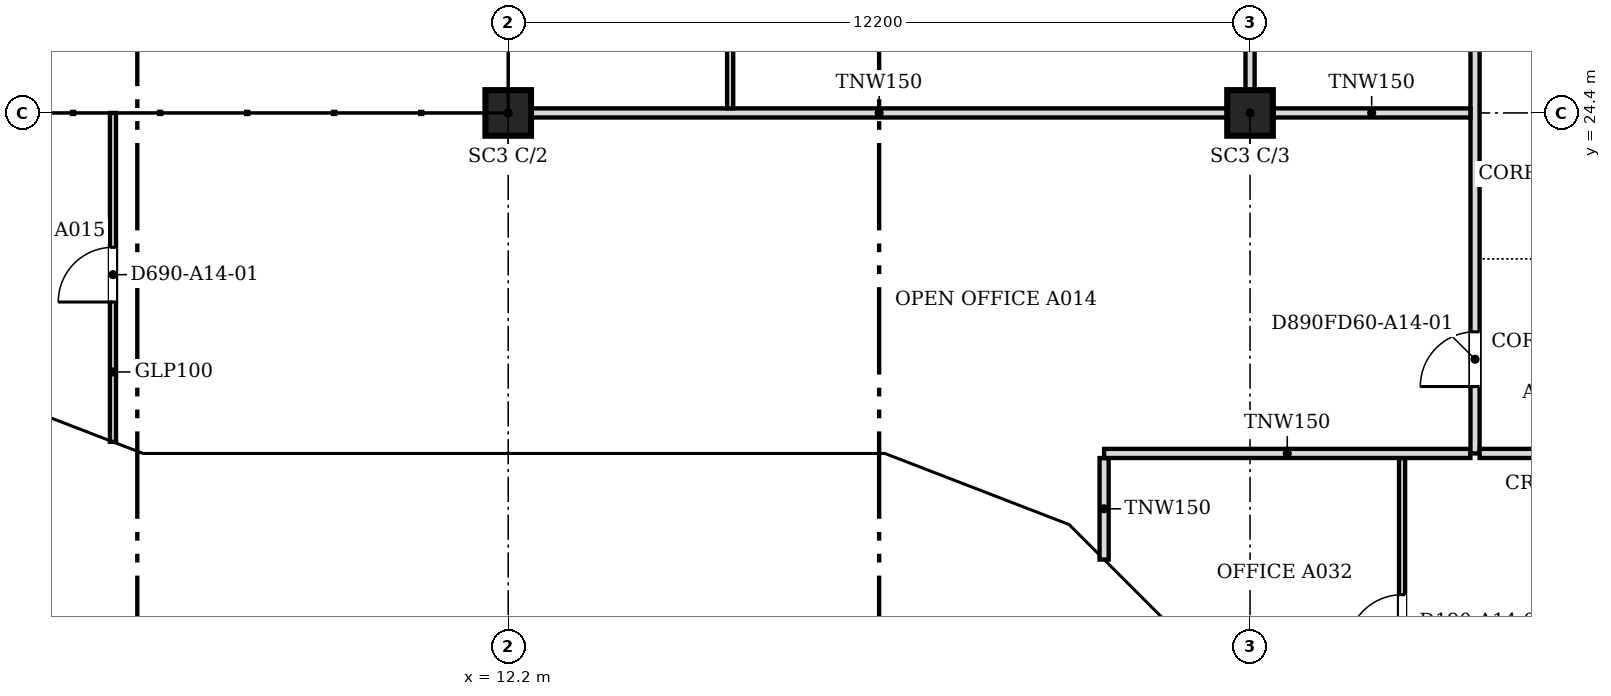
"""IFC4 building model, lengths in metres.
Left out: names, types, materials, properties, quantities, classifications, styles, units other than length and angle.
Written with IfcOpenShell. Run it as: python <this file> out.ifc"""

import sys

from ifc_helpers import new_model, si_unit, direction, frame, frame_2d, origin, origin_2d, place, context, subcontext, project, spatial, polyline, rectangle, outline, extrude, faceted_brep, source, transform, mapped, element, fill, save


model = new_model("IFC4")
c1 = context("Model", 3, precision=1e-05, world=origin(), true_north=direction((0.0, 1.0)))
c2 = subcontext(c1, "Body", "Model", "MODEL_VIEW")
j1 = project(units=[si_unit("LENGTHUNIT", "METRE"), si_unit("PLANEANGLEUNIT", "RADIAN")], contexts=[c1])
p1 = place(None, origin())
s1 = spatial("IfcSite", under=j1, at=p1, CompositionType="ELEMENT")
p2 = place(p1, origin())
s2 = spatial("IfcBuilding", under=s1, at=p2, CompositionType="ELEMENT")
p3 = place(p2, frame((0.0, 0.0, 155.4)))
s3 = spatial("IfcBuildingStorey", under=s2, at=p3, CompositionType="ELEMENT", Elevation=155.4)
for number, where, z_axis, x_axis in (
    (1, (12.2, 24.4, 0.0), (0.0, 0.0, 1.0), (1.0, 0.0, 0.0)),
    (2, (24.4, 24.4, 0.0), (0.0, 0.0, 1.0), (1.0, 0.0, 0.0)),
):
    element("IfcColumn", number, at=place(p3, frame(where, z_axis=z_axis, x_axis=x_axis)), inside=s3, PredefinedType="COLUMN", context=c2, shape_type="SweptSolid", body=[
        extrude(rectangle(XDim=0.75, YDim=0.75, at=origin_2d()), origin(), (0.0, 0.0, 1.0), 3.6),
    ])
m1 = source(origin(), c2, "Body", "Brep", [
    faceted_brep([(2.997, -0.25, 3.741), (2.95, -0.25, 3.8), (0.0, -0.25, 0.0), (2.997, -0.25, 0.0), (0.053, 0.25, 0.068), (2.904, 0.25, 3.74), (2.904, 0.25, 0.0), (0.053, 0.25, 0.0), (2.95, 0.0, 3.8), (0.0, 0.0, 0.0)], [[[0, 1, 2, 3]], [[4, 5, 6, 7]], [[8, 1, 0]], [[5, 4, 9, 2, 1, 8]], [[7, 6, 3, 2, 9]], [[7, 9, 4]], [[3, 6, 5, 8, 0]]]),
])
p4 = place(p3, frame((3.394, 19.612, 0.0), z_axis=(0.0, 0.0, 1.0), x_axis=(0.932990326376, -0.359901446078, 0.0)))
e3 = element("IfcWall", 3, at=p4, inside=s3, PredefinedType="SOLIDWALL", context=c2, shape_type="MappedRepresentation", body=[
    mapped(m1, transform((0.0, 0.0, 0.0), scale=1.0)),
])
m2 = source(origin(), c2, "Body", "SweptSolid", [
    extrude(outline(polyline([(2.75, 3.135), (0.511, 0.25), (2.75, 0.25), (2.75, 3.135)])), frame((0.0, 0.26, 0.0), z_axis=(0.0, -1.0, 0.0), x_axis=(1.0, 0.0, 0.0)), (0.0, 0.0, 1.0), 0.52),
])
p5 = place(p4, origin())
e4 = element("IfcOpeningElement", 4, at=p5, cuts=e3, PredefinedType="OPENING", context=c2, shape_type="MappedRepresentation", body=[
    mapped(m2, transform((0.0, 0.0, 0.0), scale=1.0)),
])
m3 = source(origin(), c2, "Body", "Brep", [
    faceted_brep([(3.05, -0.25, 0.0), (0.047, -0.25, 3.8), (0.0, -0.25, 3.74), (0.0, -0.25, 0.0), (0.093, 0.25, 3.741), (3.05, 0.25, 0.0), (0.093, 0.25, 0.0), (0.047, 0.0, 3.8)], [[[0, 1, 2, 3]], [[4, 5, 6]], [[5, 4, 7, 1, 0]], [[2, 1, 7]], [[6, 5, 0, 3]], [[6, 3, 2, 7, 4]]]),
])
p6 = place(p3, frame((6.1, 18.55, 0.0), z_axis=(0.0, 0.0, 1.0), x_axis=(1.0, 0.0, 0.0)))
e5 = element("IfcWall", 5, at=p6, inside=s3, PredefinedType="SOLIDWALL", context=c2, shape_type="MappedRepresentation", body=[
    mapped(m3, transform((0.0, 0.0, 0.0), scale=1.0)),
])
m4 = source(origin(), c2, "Body", "SweptSolid", [
    extrude(outline(polyline([(2.534, 0.25), (0.247, 3.144), (0.247, 0.25), (2.534, 0.25)])), frame((0.0, 0.26, 0.0), z_axis=(0.0, -1.0, 0.0), x_axis=(1.0, 0.0, 0.0)), (0.0, 0.0, 1.0), 0.52),
])
p7 = place(p6, origin())
e6 = element("IfcOpeningElement", 6, at=p7, cuts=e5, PredefinedType="OPENING", context=c2, shape_type="MappedRepresentation", body=[
    mapped(m4, transform((0.0, 0.0, 0.0), scale=1.0)),
])
m5 = source(origin(), c2, "Body", "SweptSolid", [
    extrude(outline(polyline([(6.1, 0.0), (3.05, 3.8), (0.0, 0.0), (6.1, 0.0)])), frame((0.0, 0.25, 0.0), z_axis=(0.0, -1.0, 0.0), x_axis=(1.0, 0.0, 0.0)), (0.0, 0.0, 1.0), 0.5),
])
p8 = place(p3, frame((9.15, 18.55, 0.0), z_axis=(0.0, 0.0, 1.0), x_axis=(1.0, 0.0, 0.0)))
e7 = element("IfcWall", 7, at=p8, inside=s3, PredefinedType="SOLIDWALL", context=c2, shape_type="MappedRepresentation", body=[
    mapped(m5, transform((0.0, 0.0, 0.0), scale=1.0)),
])
m6 = source(origin(), c2, "Body", "SweptSolid", [
    extrude(outline(polyline([(5.579, 0.25), (3.05, 3.401), (0.521, 0.25), (5.579, 0.25)])), frame((0.0, 0.26, 0.0), z_axis=(0.0, -1.0, 0.0), x_axis=(1.0, 0.0, 0.0)), (0.0, 0.0, 1.0), 0.52),
])
p9 = place(p8, origin())
e8 = element("IfcOpeningElement", 8, at=p9, cuts=e7, PredefinedType="OPENING", context=c2, shape_type="MappedRepresentation", body=[
    mapped(m6, transform((0.0, 0.0, 0.0), scale=1.0)),
])
m7 = source(origin(), c2, "Body", "Brep", [
    faceted_brep([(3.05, -0.25, 3.743), (0.0, -0.25, 0.0), (3.05, -0.25, 0.0), (0.0, 0.25, 0.0), (3.096, 0.25, 3.8), (3.143, 0.25, 3.744), (3.143, 0.25, 0.0), (3.096, -0.0, 3.8)], [[[0, 1, 2]], [[3, 4, 5, 6]], [[5, 4, 7]], [[4, 3, 1, 0, 7]], [[3, 6, 2, 1]], [[2, 6, 5, 7, 0]]]),
])
p10 = place(p3, frame((15.25, 18.55, 0.0), z_axis=(0.0, 0.0, 1.0), x_axis=(1.0, 0.0, 0.0)))
e9 = element("IfcWall", 9, at=p10, inside=s3, PredefinedType="SOLIDWALL", context=c2, shape_type="MappedRepresentation", body=[
    mapped(m7, transform((0.0, 0.0, 0.0), scale=1.0)),
])
m8 = source(origin(), c2, "Body", "SweptSolid", [
    extrude(outline(polyline([(2.896, 3.159), (0.526, 0.25), (2.896, 0.25), (2.896, 3.159)])), frame((0.0, 0.26, 0.0), z_axis=(0.0, -1.0, 0.0), x_axis=(1.0, 0.0, 0.0)), (0.0, 0.0, 1.0), 0.52),
])
p11 = place(p10, origin())
e10 = element("IfcOpeningElement", 10, at=p11, cuts=e9, PredefinedType="OPENING", context=c2, shape_type="MappedRepresentation", body=[
    mapped(m8, transform((0.0, 0.0, 0.0), scale=1.0)),
])
m9 = source(origin(), c2, "Body", "Brep", [
    faceted_brep([(3.143, -0.25, 0.064), (0.093, -0.25, 3.744), (0.093, -0.25, 0.0), (3.143, -0.25, 0.0), (0.0, 0.25, 3.743), (0.047, 0.25, 3.8), (3.196, 0.25, 0.0), (0.0, 0.25, 0.0), (0.047, 0.0, 3.8), (3.196, -0.0, 0.0)], [[[0, 1, 2, 3]], [[4, 5, 6, 7]], [[6, 5, 8, 1, 0, 9]], [[5, 4, 8]], [[7, 6, 9, 3, 2]], [[7, 2, 1, 8, 4]], [[3, 9, 0]]]),
])
p12 = place(p3, frame((18.303, 18.567, 0.0), z_axis=(0.0, 0.0, 1.0), x_axis=(0.932978940178, -0.359930961693, 0.0)))
e11 = element("IfcWall", 11, at=p12, inside=s3, PredefinedType="SOLIDWALL", context=c2, shape_type="MappedRepresentation", body=[
    mapped(m9, transform((0.0, 0.0, 0.0), scale=1.0)),
])
m10 = source(origin(), c2, "Body", "SweptSolid", [
    extrude(outline(polyline([(2.664, 0.25), (0.247, 3.167), (0.247, 0.25), (2.664, 0.25)])), frame((0.0, 0.26, 0.0), z_axis=(0.0, -1.0, 0.0), x_axis=(1.0, 0.0, 0.0)), (0.0, 0.0, 1.0), 0.52),
])
p13 = place(p12, origin())
e12 = element("IfcOpeningElement", 12, at=p13, cuts=e11, PredefinedType="OPENING", context=c2, shape_type="MappedRepresentation", body=[
    mapped(m10, transform((0.0, 0.0, 0.0), scale=1.0)),
])
m11 = source(origin(), c2, "Body", "Brep", [
    faceted_brep([(3.103, -0.25, 3.736), (0.053, -0.25, 0.064), (0.053, -0.25, 0.0), (3.103, -0.25, 0.0), (0.0, 0.25, 0.0), (3.156, 0.25, 3.8), (3.209, 0.25, 3.736), (3.209, 0.25, 0.0), (3.156, -0.0, 3.8), (0.0, 0.0, 0.0)], [[[0, 1, 2, 3]], [[4, 5, 6, 7]], [[6, 5, 8]], [[5, 4, 9, 1, 0, 8]], [[4, 7, 3, 2, 9]], [[9, 2, 1]], [[3, 7, 6, 8, 0]]]),
])
p14 = place(p3, frame((21.285, 17.417, 0.0), z_axis=(0.0, 0.0, 1.0), x_axis=(0.707106781187, -0.707106781187, 0.0)))
e13 = element("IfcWall", 13, at=p14, inside=s3, PredefinedType="SOLIDWALL", context=c2, shape_type="MappedRepresentation", body=[
    mapped(m11, transform((0.0, 0.0, 0.0), scale=1.0)),
])
m12 = source(origin(), c2, "Body", "SweptSolid", [
    extrude(outline(polyline([(2.956, 3.168), (0.533, 0.25), (2.956, 0.25), (2.956, 3.168)])), frame((0.0, 0.26, 0.0), z_axis=(0.0, -1.0, 0.0), x_axis=(1.0, 0.0, 0.0)), (0.0, 0.0, 1.0), 0.52),
])
p15 = place(p14, origin())
e14 = element("IfcOpeningElement", 14, at=p15, cuts=e13, PredefinedType="OPENING", context=c2, shape_type="MappedRepresentation", body=[
    mapped(m12, transform((0.0, 0.0, 0.0), scale=1.0)),
])
p16 = place(p2, frame((0.0, 0.0, 159.2)))
s4 = spatial("IfcBuildingStorey", under=s2, at=p16, CompositionType="ELEMENT", Elevation=159.2)
m13 = source(origin(), c2, "Body", "Brep", [
    faceted_brep([(0.053, -0.25, 0.0), (3.003, -0.25, 3.8), (0.053, -0.25, 7.6), (0.0, -0.25, 7.532), (0.0, -0.25, 0.068), (0.106, 0.25, 7.532), (2.957, 0.25, 3.86), (2.957, 0.25, 3.74), (0.106, 0.25, 0.068), (3.003, 0.0, 3.8), (0.053, 0.0, 0.0), (0.053, 0.0, 7.6)], [[[0, 1, 2, 3, 4]], [[5, 6, 7, 8]], [[8, 7, 9, 1, 0, 10]], [[6, 5, 11, 2, 1, 9]], [[3, 2, 11]], [[10, 0, 4]], [[8, 10, 4, 3, 11, 5]], [[9, 7, 6]]]),
])
p17 = place(p16, frame((3.344, 19.631, -3.8), z_axis=(0.0, 0.0, 1.0), x_axis=(0.933007896601, -0.359855894603, 0.0)))
e15 = element("IfcWall", 15, at=p17, inside=s4, PredefinedType="SOLIDWALL", context=c2, shape_type="MappedRepresentation", body=[
    mapped(m13, transform((0.0, 0.0, 0.0), scale=1.0)),
])
m14 = source(origin(), c2, "Body", "SweptSolid", [
    extrude(outline(polyline([(0.253, 0.665), (2.687, 3.8), (0.253, 6.935), (0.253, 0.665)])), frame((0.0, 0.26, 0.0), z_axis=(0.0, -1.0, 0.0), x_axis=(1.0, 0.0, 0.0)), (0.0, 0.0, 1.0), 0.52),
])
p18 = place(p17, origin())
e16 = element("IfcOpeningElement", 16, at=p18, cuts=e15, PredefinedType="OPENING", context=c2, shape_type="MappedRepresentation", body=[
    mapped(m14, transform((0.0, 0.0, 0.0), scale=1.0)),
])
m15 = source(origin(), c2, "Body", "Brep", [
    faceted_brep([(3.003, -0.25, 0.0), (6.053, -0.25, 3.8), (3.003, -0.25, 7.6), (0.0, -0.25, 3.8), (0.047, 0.25, 3.859), (3.003, 0.25, 7.6), (6.053, 0.25, 3.8), (3.003, 0.25, 0.0), (0.047, 0.25, 3.741), (0.0, 0.0, 3.8)], [[[0, 1, 2, 3]], [[4, 5, 6, 7, 8]], [[7, 6, 1, 0]], [[6, 5, 2, 1]], [[5, 4, 9, 3, 2]], [[8, 7, 0, 3, 9]], [[8, 9, 4]]]),
])
p19 = place(p16, frame((6.146, 18.55, -3.8), z_axis=(0.0, 0.0, 1.0), x_axis=(1.0, 0.0, 0.0)))
e17 = element("IfcWall", 17, at=p19, inside=s4, PredefinedType="SOLIDWALL", context=c2, shape_type="MappedRepresentation", body=[
    mapped(m15, transform((0.0, 0.0, 0.0), scale=1.0)),
])
m16 = source(origin(), c2, "Body", "SweptSolid", [
    extrude(outline(polyline([(3.005, 0.401), (5.733, 3.8), (3.005, 7.199), (0.319, 3.8), (3.005, 0.401)])), frame((0.0, 0.26, 0.0), z_axis=(0.0, -1.0, 0.0), x_axis=(1.0, 0.0, 0.0)), (0.0, 0.0, 1.0), 0.52),
])
p20 = place(p19, origin())
e18 = element("IfcOpeningElement", 18, at=p20, cuts=e17, PredefinedType="OPENING", context=c2, shape_type="MappedRepresentation", body=[
    mapped(m16, transform((0.0, 0.0, 0.0), scale=1.0)),
])
m17 = source(origin(), c2, "Body", "Brep", [
    faceted_brep([(3.05, -0.25, 0.0), (6.1, -0.25, 3.743), (6.1, -0.25, 3.857), (3.05, -0.25, 7.6), (0.0, -0.25, 3.8), (0.0, 0.25, 3.8), (3.05, 0.25, 7.6), (6.146, 0.25, 3.8), (3.05, 0.25, 0.0), (6.146, -0.0, 3.8)], [[[0, 1, 2, 3, 4]], [[5, 6, 7, 8]], [[8, 7, 9, 1, 0]], [[7, 6, 3, 2, 9]], [[6, 5, 4, 3]], [[5, 8, 0, 4]], [[1, 9, 2]]]),
])
p21 = place(p16, frame((12.2, 18.55, -3.8), z_axis=(0.0, 0.0, 1.0), x_axis=(1.0, 0.0, 0.0)))
e19 = element("IfcWall", 19, at=p21, inside=s4, PredefinedType="SOLIDWALL", context=c2, shape_type="MappedRepresentation", body=[
    mapped(m17, transform((0.0, 0.0, 0.0), scale=1.0)),
])
m18 = source(origin(), c2, "Body", "SweptSolid", [
    extrude(outline(polyline([(3.052, 0.398), (5.824, 3.8), (3.052, 7.203), (0.321, 3.8), (3.052, 0.398)])), frame((0.0, 0.26, 0.0), z_axis=(0.0, -1.0, 0.0), x_axis=(1.0, 0.0, 0.0)), (0.0, 0.0, 1.0), 0.52),
])
p22 = place(p21, origin())
e20 = element("IfcOpeningElement", 20, at=p22, cuts=e19, PredefinedType="OPENING", context=c2, shape_type="MappedRepresentation", body=[
    mapped(m18, transform((0.0, 0.0, 0.0), scale=1.0)),
])
m19 = source(origin(), c2, "Body", "Brep", [
    faceted_brep([(3.096, -0.25, 7.536), (0.047, -0.25, 3.856), (0.047, -0.25, 3.744), (3.096, -0.25, 0.064), (0.0, 0.25, 3.8), (3.149, 0.25, 7.6), (3.202, 0.25, 7.536), (3.202, 0.25, 0.064), (3.149, 0.25, 0.0), (3.149, -0.0, 0.0), (3.149, -0.0, 7.6), (0.0, 0.0, 3.8)], [[[0, 1, 2, 3]], [[4, 5, 6, 7, 8]], [[8, 7, 9]], [[6, 5, 10]], [[5, 4, 11, 1, 0, 10]], [[4, 8, 9, 3, 2, 11]], [[11, 2, 1]], [[3, 9, 7, 6, 10, 0]]]),
])
p23 = place(p16, frame((18.346, 18.55, -3.8), z_axis=(0.0, 0.0, 1.0), x_axis=(0.932985567668, -0.359913782069, 0.0)))
e21 = element("IfcWall", 21, at=p23, inside=s4, PredefinedType="SOLIDWALL", context=c2, shape_type="MappedRepresentation", body=[
    mapped(m19, transform((0.0, 0.0, 0.0), scale=1.0)),
])
m20 = source(origin(), c2, "Body", "SweptSolid", [
    extrude(outline(polyline([(2.949, 6.967), (0.325, 3.8), (2.949, 0.633), (2.949, 6.967)])), frame((0.0, 0.26, 0.0), z_axis=(0.0, -1.0, 0.0), x_axis=(1.0, 0.0, 0.0)), (0.0, 0.0, 1.0), 0.52),
])
p24 = place(p23, origin())
e22 = element("IfcOpeningElement", 22, at=p24, cuts=e21, PredefinedType="OPENING", context=c2, shape_type="MappedRepresentation", body=[
    mapped(m20, transform((0.0, 0.0, 0.0), scale=1.0)),
])
m21 = source(origin(), c2, "Body", "Brep", [
    faceted_brep([(0.106, -0.25, 0.064), (3.156, -0.25, 3.736), (3.156, -0.25, 3.864), (0.106, -0.25, 7.536), (0.0, 0.25, 7.536), (0.053, 0.25, 7.6), (3.209, 0.25, 3.8), (0.053, 0.25, 0.0), (0.0, 0.25, 0.064), (3.209, -0.0, 3.8), (0.053, 0.0, 0.0), (0.053, 0.0, 7.6)], [[[0, 1, 2, 3]], [[4, 5, 6, 7, 8]], [[7, 6, 9, 1, 0, 10]], [[6, 5, 11, 3, 2, 9]], [[5, 4, 11]], [[8, 7, 10]], [[8, 10, 0, 3, 11, 4]], [[1, 9, 2]]]),
])
p25 = place(p16, frame((21.248, 17.454, -3.8), z_axis=(0.0, 0.0, 1.0), x_axis=(0.707106781187, -0.707106781187, 0.0)))
e23 = element("IfcWall", 23, at=p25, inside=s4, PredefinedType="SOLIDWALL", context=c2, shape_type="MappedRepresentation", body=[
    mapped(m21, transform((0.0, 0.0, 0.0), scale=1.0)),
])
m22 = source(origin(), c2, "Body", "SweptSolid", [
    extrude(outline(polyline([(0.253, 0.632), (2.884, 3.8), (0.253, 6.968), (0.253, 0.632)])), frame((0.0, 0.26, 0.0), z_axis=(0.0, -1.0, 0.0), x_axis=(1.0, 0.0, 0.0)), (0.0, 0.0, 1.0), 0.52),
])
p26 = place(p25, origin())
e24 = element("IfcOpeningElement", 24, at=p26, cuts=e23, PredefinedType="OPENING", context=c2, shape_type="MappedRepresentation", body=[
    mapped(m22, transform((0.0, 0.0, 0.0), scale=1.0)),
])
p27 = place(p3, frame((26.9, 13.276, 0.0), z_axis=(0.0, 0.0, 1.0), x_axis=(0.0, 1.0, 0.0)))
e25 = element("IfcWall", 25, at=p27, inside=s3, PredefinedType="PARTITIONING", context=c2, shape_type="SweptSolid", body=[
    extrude(rectangle(XDim=5.448, YDim=0.1, at=frame_2d((2.724, 0.0))), origin(), (0.0, 0.0, 1.0), 3.067),
])
m23 = source(origin(), c2, "Body", "SweptSolid", [
    extrude(rectangle(XDim=0.9, YDim=2.1, at=frame_2d((0.45, 1.05))), frame((0.0, 0.06, 0.0), z_axis=(0.0, -1.0, 0.0), x_axis=(1.0, 0.0, 0.0)), (0.0, 0.0, 1.0), 0.12),
])
p28 = place(p27, frame((2.3, 0.0, 0.0)))
e26 = element("IfcOpeningElement", 26, at=p28, cuts=e25, PredefinedType="OPENING", context=c2, shape_type="MappedRepresentation", body=[
    mapped(m23, transform((0.0, 0.0, 0.0), scale=1.0)),
])
p29 = place(p3, frame((22.0, 17.055, 0.0), z_axis=(0.0, 0.0, 1.0), x_axis=(0.0, 1.0, 0.0)))
e27 = element("IfcWall", 27, at=p29, inside=s3, PredefinedType="PARTITIONING", context=c2, shape_type="SweptSolid", body=[
    extrude(rectangle(XDim=1.669, YDim=0.15, at=frame_2d((0.834, 0.0))), origin(), (0.0, 0.0, 1.0), 3.067),
])
p30 = place(p3, frame((22.0, 18.8, 0.0), z_axis=(0.0, 0.0, 1.0), x_axis=(1.0, 0.0, 0.0)))
e28 = element("IfcWall", 28, at=p30, inside=s3, PredefinedType="PARTITIONING", context=c2, shape_type="SweptSolid", body=[
    extrude(rectangle(XDim=6.024, YDim=0.15, at=frame_2d((3.012, 0.0))), origin(), (0.0, 0.0, 1.0), 3.067),
])
p31 = place(p3, frame((28.1, 18.8, 0.0), z_axis=(0.0, 0.0, 1.0), x_axis=(0.0, 1.0, 0.0)))
e29 = element("IfcWall", 29, at=p31, inside=s3, PredefinedType="PARTITIONING", context=c2, shape_type="SweptSolid", body=[
    extrude(rectangle(XDim=26.5, YDim=0.15, at=frame_2d((13.25, 0.0))), origin(), (0.0, 0.0, 1.0), 3.067),
])
m24 = source(origin(), c2, "Body", "SweptSolid", [
    extrude(rectangle(XDim=0.9, YDim=2.1, at=frame_2d((0.45, 1.05))), frame((0.0, 0.085, 0.0), z_axis=(0.0, -1.0, 0.0), x_axis=(1.0, 0.0, 0.0)), (0.0, 0.0, 1.0), 0.17),
])
p32 = place(p31, frame((1.1, 0.0, 0.0)))
e30 = element("IfcOpeningElement", 30, at=p32, cuts=e29, PredefinedType="OPENING", context=c2, shape_type="MappedRepresentation", body=[
    mapped(m24, transform((0.0, 0.0, 0.0), scale=1.0)),
])
m25 = source(origin(), c2, "Body", "SweptSolid", [
    extrude(rectangle(XDim=1.0, YDim=2.1, at=frame_2d((0.5, 1.05))), frame((0.0, 0.085, 0.0), z_axis=(0.0, -1.0, 0.0), x_axis=(1.0, 0.0, 0.0)), (0.0, 0.0, 1.0), 0.17),
])
p33 = place(p31, frame((23.151, 0.0, 0.0)))
e31 = element("IfcOpeningElement", 31, at=p33, cuts=e29, PredefinedType="OPENING", context=c2, shape_type="MappedRepresentation", body=[
    mapped(m25, transform((0.0, 0.0, 0.0), scale=1.0)),
])
p34 = place(p31, frame((8.1, 0.0, 0.0)))
e32 = element("IfcOpeningElement", 32, at=p34, cuts=e29, PredefinedType="OPENING", context=c2, shape_type="MappedRepresentation", body=[
    mapped(m25, transform((0.0, 0.0, 0.0), scale=1.0)),
])
p35 = place(p31, frame((15.8, 0.0, 0.0)))
e33 = element("IfcOpeningElement", 33, at=p35, cuts=e29, PredefinedType="OPENING", context=c2, shape_type="MappedRepresentation", body=[
    mapped(m24, transform((0.0, 0.0, 0.0), scale=1.0)),
])
p36 = place(p3, frame((28.176, 18.8, 0.0), z_axis=(0.0, 0.0, 1.0), x_axis=(1.0, 0.0, 0.0)))
e34 = element("IfcWall", 34, at=p36, inside=s3, PredefinedType="PARTITIONING", context=c2, shape_type="SweptSolid", body=[
    extrude(rectangle(XDim=2.248, YDim=0.15, at=frame_2d((1.124, 0.0))), origin(), (0.0, 0.0, 1.0), 3.067),
])
p37 = place(p3, frame((5.7, 18.99, 0.0), z_axis=(0.0, 0.0, 1.0), x_axis=(0.0, 1.0, 0.0)))
e35 = element("IfcWall", 35, at=p37, inside=s3, PredefinedType="PARTITIONING", context=c2, shape_type="SweptSolid", body=[
    extrude(rectangle(XDim=5.41, YDim=0.1, at=frame_2d((2.705, 0.0))), origin(), (0.0, 0.0, 1.0), 3.067),
])
p38 = place(p37, frame((2.3, 0.0, 0.0)))
e36 = element("IfcOpeningElement", 36, at=p38, cuts=e35, PredefinedType="OPENING", context=c2, shape_type="MappedRepresentation", body=[
    mapped(m23, transform((0.0, 0.0, 0.0), scale=1.0)),
])
p39 = place(p3, frame((12.576, 24.4, 0.0), z_axis=(0.0, 0.0, 1.0), x_axis=(1.0, 0.0, 0.0)))
e37 = element("IfcWall", 37, at=p39, inside=s3, PredefinedType="PARTITIONING", context=c2, shape_type="SweptSolid", body=[
    extrude(rectangle(XDim=11.448, YDim=0.15, at=frame_2d((5.724, 0.0))), origin(), (0.0, 0.0, 1.0), 3.067),
])
p40 = place(p3, frame((24.776, 24.4, 0.0), z_axis=(0.0, 0.0, 1.0), x_axis=(1.0, 0.0, 0.0)))
e38 = element("IfcWall", 38, at=p40, inside=s3, PredefinedType="PARTITIONING", context=c2, shape_type="SweptSolid", body=[
    extrude(rectangle(XDim=3.248, YDim=0.15, at=frame_2d((1.624, 0.0))), origin(), (0.0, 0.0, 1.0), 3.067),
])
p41 = place(p3, frame((15.85, 24.476, 0.0), z_axis=(0.0, 0.0, 1.0), x_axis=(0.0, 1.0, 0.0)))
e39 = element("IfcWall", 39, at=p41, inside=s3, PredefinedType="PARTITIONING", context=c2, shape_type="SweptSolid", body=[
    extrude(rectangle(XDim=5.948, YDim=0.1, at=frame_2d((2.974, 0.0))), origin(), (0.0, 0.0, 1.0), 3.067),
])
p42 = place(p41, frame((2.5, 0.0, 0.0)))
e40 = element("IfcOpeningElement", 40, at=p42, cuts=e39, PredefinedType="OPENING", context=c2, shape_type="MappedRepresentation", body=[
    mapped(m23, transform((0.0, 0.0, 0.0), scale=1.0)),
])
p43 = place(p3, frame((24.4, 24.776, 0.0), z_axis=(0.0, 0.0, 1.0), x_axis=(0.0, 1.0, 0.0)))
e41 = element("IfcWall", 41, at=p43, inside=s3, PredefinedType="PARTITIONING", context=c2, shape_type="SweptSolid", body=[
    extrude(rectangle(XDim=5.648, YDim=0.15, at=frame_2d((2.824, 0.0))), origin(), (0.0, 0.0, 1.0), 3.067),
])
p44 = place(p43, frame((2.4, 0.0, 0.0)))
e42 = element("IfcOpeningElement", 42, at=p44, cuts=e41, PredefinedType="OPENING", context=c2, shape_type="MappedRepresentation", body=[
    mapped(m24, transform((0.0, 0.0, 0.0), scale=1.0)),
])
m26 = source(origin(), c2, "Body", "SweptSolid", [
    extrude(rectangle(XDim=0.9, YDim=2.1, at=frame_2d((0.45, 1.05))), frame((0.0, 0.025, 0.0), z_axis=(0.0, -1.0, 0.0), x_axis=(1.0, 0.0, 0.0)), (0.0, 0.0, 1.0), 0.05),
])
p45 = place(p32, origin())
e43 = element("IfcDoor", 43, at=p45, inside=s3, OperationType="SINGLE_SWING_LEFT", PredefinedType="DOOR", context=c2, shape_type="MappedRepresentation", body=[
    mapped(m26, transform((0.0, 0.0, 0.0), scale=1.0)),
])
fill(e30, e43)
p46 = place(p38, origin())
e44 = element("IfcDoor", 44, at=p46, inside=s3, OperationType="SINGLE_SWING_LEFT", PredefinedType="DOOR", context=c2, shape_type="MappedRepresentation", body=[
    mapped(m26, transform((0.0, 0.0, 0.0), scale=1.0)),
])
fill(e36, e44)
p47 = place(p28, origin())
e45 = element("IfcDoor", 45, at=p47, inside=s3, OperationType="SINGLE_SWING_LEFT", PredefinedType="DOOR", context=c2, shape_type="MappedRepresentation", body=[
    mapped(m26, transform((0.0, 0.0, 0.0), scale=1.0)),
])
fill(e26, e45)
save(model, sys.argv[1])
